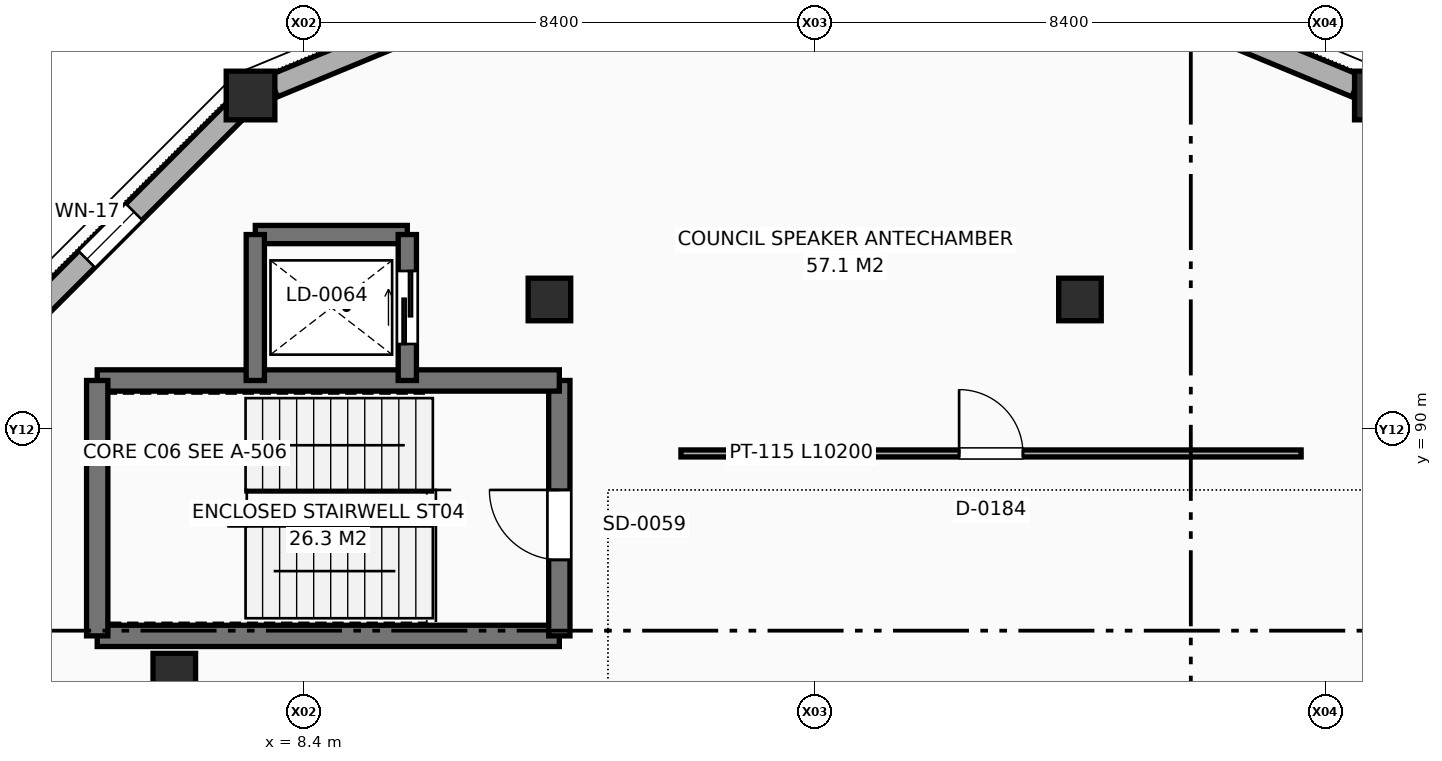
"""IFC4 building model, lengths in metres.
Left out: names, types, materials, properties, quantities, classifications, styles, units other than length and angle.
Written with IfcOpenShell. Run it as: python <this file> out.ifc"""

import sys

from ifc_helpers import new_model, si_unit, direction, frame, frame_2d, origin, origin_2d, place, context, subcontext, project, spatial, rectangle, circle, extrude, element, fill, save


model = new_model("IFC4")
c1 = context("Model", 3, precision=1e-05, world=origin(), true_north=direction((0.0, 1.0)))
c2 = subcontext(c1, "Body", "Model", "MODEL_VIEW")
j1 = project(units=[si_unit("LENGTHUNIT", "METRE"), si_unit("PLANEANGLEUNIT", "RADIAN")], contexts=[c1])
p1 = place(None, origin())
s1 = spatial("IfcSite", under=j1, at=p1, CompositionType="ELEMENT")
p2 = place(p1, origin())
s2 = spatial("IfcBuilding", under=s1, at=p2, CompositionType="ELEMENT")
p3 = place(p2, frame((0.0, 0.0, 5.4)))
s3 = spatial("IfcBuildingStorey", under=s2, at=p3, CompositionType="ELEMENT", Elevation=5.4)
for number, where, z_axis, x_axis in (
    (1, (26.079, 95.486, 0.0), (0.0, 0.0, 1.0), (1.0, 0.0, 0.0)),
    (2, (7.521, 95.486, 0.0), (0.0, 0.0, 1.0), (1.0, 0.0, 0.0)),
):
    element("IfcColumn", number, at=place(p3, frame(where, z_axis=z_axis, x_axis=x_axis)), inside=s3, PredefinedType="COLUMN", context=c2, shape_type="SweptSolid", body=[
        extrude(circle(Radius=0.4, at=origin_2d()), origin(), (0.0, 0.0, 1.0), 4.2),
    ])
for number, where, z_axis, x_axis in (
    (3, (21.163, 92.132, 0.0), (0.0, 0.0, 1.0), (1.0, 0.0, 0.0)),
    (4, (12.438, 92.132, 0.0), (0.0, 0.0, 1.0), (1.0, 0.0, 0.0)),
    (5, (6.268, 85.963, 0.0), (0.0, 0.0, 1.0), (1.0, 0.0, 0.0)),
):
    element("IfcColumn", number, at=place(p3, frame(where, z_axis=z_axis, x_axis=x_axis)), inside=s3, PredefinedType="COLUMN", context=c2, shape_type="SweptSolid", body=[
        extrude(circle(Radius=0.35, at=origin_2d()), origin(), (0.0, 0.0, 1.0), 4.2),
    ])
p4 = place(p3, frame((25.707, 95.64, 0.0), z_axis=(0.0, 0.0, 1.0), x_axis=(-0.923874097972, 0.382696552241, 0.0)))
e6 = element("IfcWall", 6, at=p4, inside=s3, PredefinedType="SOLIDWALL", context=c2, shape_type="SweptSolid", body=[
    extrude(rectangle(XDim=5.712, YDim=0.38, at=frame_2d((2.856, 0.0))), origin(), (0.0, 0.0, 1.0), 3.13),
])
p5 = place(p4, frame((2.306, 0.0, 0.9)))
e7 = element("IfcOpeningElement", 7, at=p5, cuts=e6, PredefinedType="OPENING", context=c2, shape_type="SweptSolid", body=[
    extrude(rectangle(XDim=1.1, YDim=1.8, at=frame_2d((0.55, 0.9))), frame((0.0, 0.2, 0.0), z_axis=(0.0, -1.0, 0.0), x_axis=(1.0, 0.0, 0.0)), (0.0, 0.0, 1.0), 0.4),
])
p6 = place(p3, frame((13.17, 97.826, 0.0), z_axis=(0.0, 0.0, 1.0), x_axis=(-0.923880357201, -0.382681441383, 0.0)))
e8 = element("IfcWall", 8, at=p6, inside=s3, PredefinedType="SOLIDWALL", context=c2, shape_type="SweptSolid", body=[
    extrude(rectangle(XDim=5.712, YDim=0.38, at=frame_2d((2.856, 0.0))), origin(), (0.0, 0.0, 1.0), 3.13),
])
p7 = place(p6, frame((2.306, 0.0, 0.9)))
e9 = element("IfcOpeningElement", 9, at=p7, cuts=e8, PredefinedType="OPENING", context=c2, shape_type="SweptSolid", body=[
    extrude(rectangle(XDim=1.1, YDim=1.8, at=frame_2d((0.55, 0.9))), frame((0.0, 0.2, 0.0), z_axis=(0.0, -1.0, 0.0), x_axis=(1.0, 0.0, 0.0)), (0.0, 0.0, 1.0), 0.4),
])
p8 = place(p3, frame((7.237, 95.202, 0.0), z_axis=(0.0, 0.0, 1.0), x_axis=(-0.707128150708, -0.707085411019, 0.0)))
e10 = element("IfcWall", 10, at=p8, inside=s3, PredefinedType="SOLIDWALL", context=c2, shape_type="SweptSolid", body=[
    extrude(rectangle(XDim=5.712, YDim=0.38, at=frame_2d((2.856, 0.0))), origin(), (0.0, 0.0, 1.0), 3.13),
])
p9 = place(p8, frame((2.306, 0.0, 0.9)))
e11 = element("IfcOpeningElement", 11, at=p9, cuts=e10, PredefinedType="OPENING", context=c2, shape_type="SweptSolid", body=[
    extrude(rectangle(XDim=1.1, YDim=1.8, at=frame_2d((0.55, 0.9))), frame((0.0, 0.2, 0.0), z_axis=(0.0, -1.0, 0.0), x_axis=(1.0, 0.0, 0.0)), (0.0, 0.0, 1.0), 0.4),
])
p10 = place(p3, frame((5.0, 86.6, 0.0), z_axis=(0.0, 0.0, 1.0), x_axis=(1.0, 0.0, 0.0)))
e12 = element("IfcWall", 12, at=p10, inside=s3, PredefinedType="SHEAR", context=c2, shape_type="SweptSolid", body=[
    extrude(rectangle(XDim=7.6, YDim=0.35, at=frame_2d((3.8, 0.0))), origin(), (0.0, 0.0, 1.0), 3.92),
])
p11 = place(p3, frame((12.6, 86.6, 0.0), z_axis=(0.0, 0.0, 1.0), x_axis=(0.0, 1.0, 0.0)))
e13 = element("IfcWall", 13, at=p11, inside=s3, PredefinedType="SHEAR", context=c2, shape_type="SweptSolid", body=[
    extrude(rectangle(XDim=4.2, YDim=0.35, at=frame_2d((2.1, 0.0))), origin(), (0.0, 0.0, 1.0), 3.92),
])
p12 = place(p11, frame((1.25, 0.0, 0.0)))
e14 = element("IfcOpeningElement", 14, at=p12, cuts=e13, PredefinedType="OPENING", context=c2, shape_type="SweptSolid", body=[
    extrude(rectangle(XDim=1.15, YDim=2.2, at=frame_2d((0.575, 1.1))), frame((0.0, 0.185, 0.0), z_axis=(0.0, -1.0, 0.0), x_axis=(1.0, 0.0, 0.0)), (0.0, 0.0, 1.0), 0.37),
])
p13 = place(p3, frame((12.6, 90.8, 0.0), z_axis=(0.0, 0.0, 1.0), x_axis=(-1.0, 0.0, 0.0)))
e15 = element("IfcWall", 15, at=p13, inside=s3, PredefinedType="SHEAR", context=c2, shape_type="SweptSolid", body=[
    extrude(rectangle(XDim=7.6, YDim=0.35, at=frame_2d((3.8, 0.0))), origin(), (0.0, 0.0, 1.0), 3.92),
])
p14 = place(p3, frame((5.0, 90.8, 0.0), z_axis=(0.0, 0.0, 1.0), x_axis=(0.0, -1.0, 0.0)))
e16 = element("IfcWall", 16, at=p14, inside=s3, PredefinedType="SHEAR", context=c2, shape_type="SweptSolid", body=[
    extrude(rectangle(XDim=4.2, YDim=0.35, at=frame_2d((2.1, 0.0))), origin(), (0.0, 0.0, 1.0), 3.92),
])
p15 = place(p3, frame((10.1, 93.2, 0.0), z_axis=(0.0, 0.0, 1.0), x_axis=(-1.0, 0.0, 0.0)))
e17 = element("IfcWall", 17, at=p15, inside=s3, PredefinedType="SHEAR", context=c2, shape_type="SweptSolid", body=[
    extrude(rectangle(XDim=2.5, YDim=0.3, at=frame_2d((1.25, 0.0))), origin(), (0.0, 0.0, 1.0), 3.92),
])
p16 = place(p3, frame((7.6, 93.2, 0.0), z_axis=(0.0, 0.0, 1.0), x_axis=(0.0, -1.0, 0.0)))
e18 = element("IfcWall", 18, at=p16, inside=s3, PredefinedType="SHEAR", context=c2, shape_type="SweptSolid", body=[
    extrude(rectangle(XDim=2.4, YDim=0.3, at=frame_2d((1.2, 0.0))), origin(), (0.0, 0.0, 1.0), 3.92),
])
p17 = place(p3, frame((10.1, 90.8, 0.0), z_axis=(0.0, 0.0, 1.0), x_axis=(0.0, 1.0, 0.0)))
e19 = element("IfcWall", 19, at=p17, inside=s3, PredefinedType="SHEAR", context=c2, shape_type="SweptSolid", body=[
    extrude(rectangle(XDim=2.4, YDim=0.3, at=frame_2d((1.2, 0.0))), origin(), (0.0, 0.0, 1.0), 3.92),
])
p18 = place(p17, frame((0.6, 0.0, 0.0)))
e20 = element("IfcOpeningElement", 20, at=p18, cuts=e19, PredefinedType="OPENING", context=c2, shape_type="SweptSolid", body=[
    extrude(rectangle(XDim=1.2, YDim=2.25, at=frame_2d((0.6, 1.125))), frame((0.0, 0.16, 0.0), z_axis=(0.0, -1.0, 0.0), x_axis=(1.0, 0.0, 0.0)), (0.0, 0.0, 1.0), 0.32),
])
p19 = place(p3, frame((14.6, 89.6, 0.0), z_axis=(0.0, 0.0, 1.0), x_axis=(1.0, 0.0, 0.0)))
e21 = element("IfcWall", 21, at=p19, inside=s3, PredefinedType="PARTITIONING", context=c2, shape_type="SweptSolid", body=[
    extrude(rectangle(XDim=10.2, YDim=0.115, at=frame_2d((5.1, 0.0))), origin(), (0.0, 0.0, 1.0), 3.86),
])
p20 = place(p19, frame((4.575, 0.0, 0.0)))
e22 = element("IfcOpeningElement", 22, at=p20, cuts=e21, PredefinedType="OPENING", context=c2, shape_type="SweptSolid", body=[
    extrude(rectangle(XDim=1.05, YDim=2.15, at=frame_2d((0.525, 1.075))), frame((0.0, 0.067, 0.0), z_axis=(0.0, -1.0, 0.0), x_axis=(1.0, 0.0, 0.0)), (0.0, 0.0, 1.0), 0.135),
])
p21 = place(p9, origin())
e23 = element("IfcWindow", 23, at=p21, inside=s3, PartitioningType="SINGLE_PANEL", PredefinedType="WINDOW", context=c2, shape_type="SweptSolid", body=[
    extrude(rectangle(XDim=1.1, YDim=1.8, at=frame_2d((0.55, 0.9))), frame((0.0, 0.03, 0.0), z_axis=(0.0, -1.0, 0.0), x_axis=(1.0, 0.0, 0.0)), (0.0, 0.0, 1.0), 0.06),
])
fill(e11, e23)
p22 = place(p12, origin())
e24 = element("IfcDoor", 24, at=p22, inside=s3, OperationType="SINGLE_SWING_RIGHT", PredefinedType="DOOR", context=c2, shape_type="SweptSolid", body=[
    extrude(rectangle(XDim=1.15, YDim=2.2, at=frame_2d((0.575, 1.1))), frame((0.0, 0.025, 0.0), z_axis=(0.0, -1.0, 0.0), x_axis=(1.0, 0.0, 0.0)), (0.0, 0.0, 1.0), 0.05),
])
fill(e14, e24)
p23 = place(p18, origin())
e25 = element("IfcDoor", 25, at=p23, inside=s3, OperationType="SLIDING_TO_LEFT", PredefinedType="DOOR", context=c2, shape_type="SweptSolid", body=[
    extrude(rectangle(XDim=1.2, YDim=2.25, at=frame_2d((0.6, 1.125))), frame((0.0, 0.025, 0.0), z_axis=(0.0, -1.0, 0.0), x_axis=(1.0, 0.0, 0.0)), (0.0, 0.0, 1.0), 0.05),
])
fill(e20, e25)
p24 = place(p20, origin())
e26 = element("IfcDoor", 26, at=p24, inside=s3, OperationType="SINGLE_SWING_LEFT", PredefinedType="DOOR", context=c2, shape_type="SweptSolid", body=[
    extrude(rectangle(XDim=1.05, YDim=2.15, at=frame_2d((0.525, 1.075))), frame((0.0, 0.025, 0.0), z_axis=(0.0, -1.0, 0.0), x_axis=(1.0, 0.0, 0.0)), (0.0, 0.0, 1.0), 0.05),
])
fill(e22, e26)
save(model, sys.argv[1])
